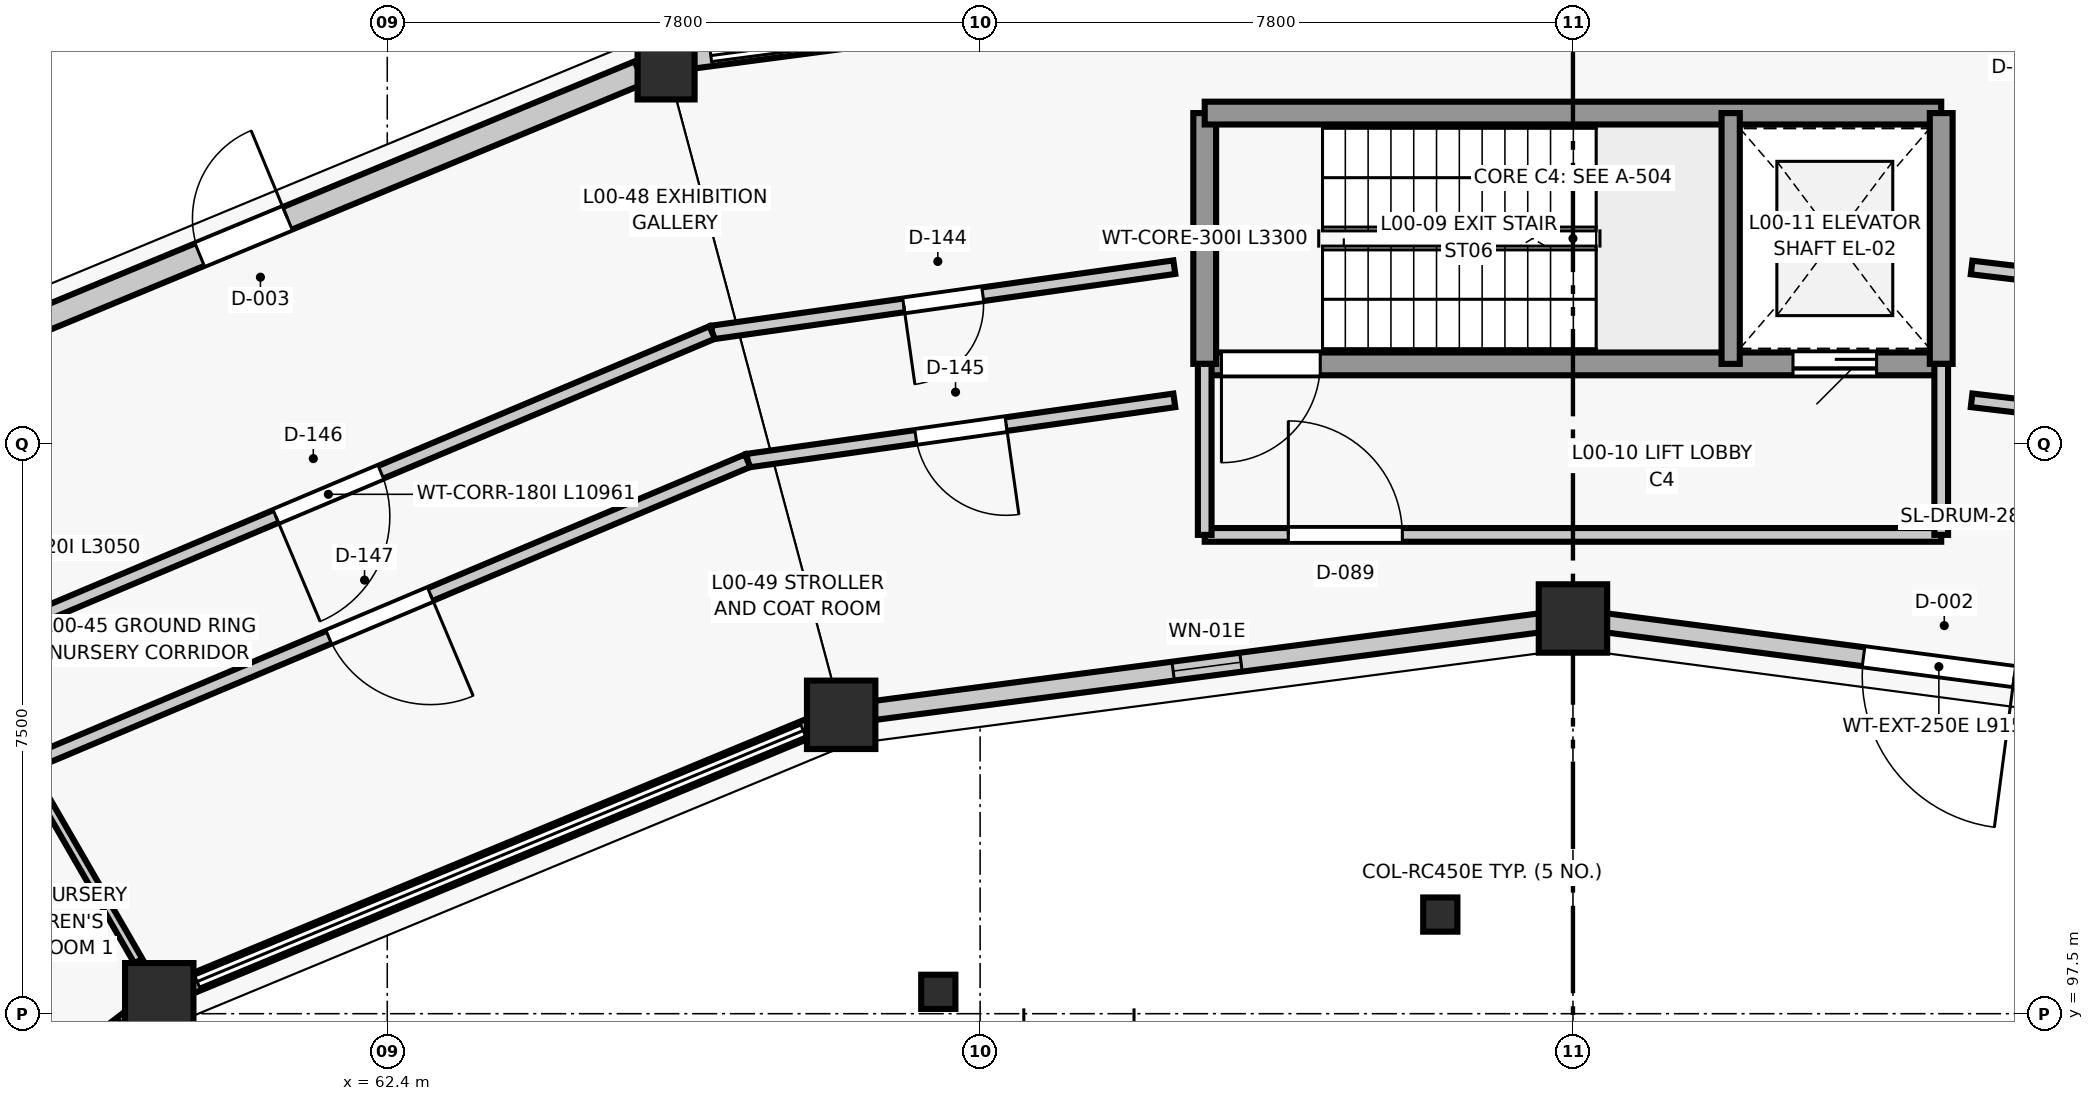
"""IFC4 building model, lengths in metres.
Left out: names, types, materials, properties, quantities, classifications, styles, units other than length and angle.
Written with IfcOpenShell. Run it as: python <this file> out.ifc"""

import sys

from ifc_helpers import new_model, si_unit, direction, frame, frame_2d, origin, origin_2d, place, context, subcontext, project, spatial, rectangle, circle, extrude, element, fill, save


model = new_model("IFC4")
c1 = context("Model", 3, precision=1e-05, world=origin(), true_north=direction((0.0, 1.0)))
c2 = subcontext(c1, "Body", "Model", "MODEL_VIEW")
j1 = project(units=[si_unit("LENGTHUNIT", "METRE"), si_unit("PLANEANGLEUNIT", "RADIAN")], contexts=[c1])
p1 = place(None, origin())
s1 = spatial("IfcSite", under=j1, at=p1, CompositionType="ELEMENT")
p2 = place(p1, origin())
s2 = spatial("IfcBuilding", under=s1, at=p2, CompositionType="ELEMENT")
p3 = place(p2, origin())
s3 = spatial("IfcBuildingStorey", under=s2, at=p3, CompositionType="ELEMENT", Elevation=0.0)
for number, where, z_axis, x_axis in (
    (1, (78.0, 102.7, 0.0), (0.0, 0.0, 1.0), (1.0, 0.0, 0.0)),
    (2, (68.372, 101.432, 0.0), (0.0, 0.0, 1.0), (1.0, 0.0, 0.0)),
    (3, (59.4, 97.716, 0.0), (0.0, 0.0, 1.0), (1.0, 0.0, 0.0)),
):
    element("IfcColumn", number, at=place(p3, frame(where, z_axis=z_axis, x_axis=x_axis)), inside=s3, PredefinedType="COLUMN", context=c2, shape_type="SweptSolid", body=[
        extrude(circle(Radius=0.45, at=origin_2d()), origin(), (0.0, 0.0, 1.0), 4.5),
    ])
p4 = place(p3, frame((66.068, 110.029, 0.0), z_axis=(0.0, 0.0, 1.0), x_axis=(1.0, 0.0, 0.0)))
e4 = element("IfcColumn", 4, at=p4, inside=s3, PredefinedType="COLUMN", context=c2, shape_type="SweptSolid", body=[
    extrude(rectangle(XDim=0.75, YDim=1.0, at=origin_2d()), origin(), (0.0, 0.0, 1.0), 4.5),
])
for number, where, z_axis, x_axis in (
    (5, (76.255, 98.804, 0.0), (0.0, 0.0, 1.0), (1.0, 0.0, 0.0)),
    (6, (69.65, 97.788, 0.0), (0.0, 0.0, 1.0), (1.0, 0.0, 0.0)),
):
    element("IfcColumn", number, at=place(p3, frame(where, z_axis=z_axis, x_axis=x_axis)), inside=s3, PredefinedType="COLUMN", context=c2, shape_type="SweptSolid", body=[
        extrude(rectangle(XDim=0.45, YDim=0.45, at=origin_2d()), origin(), (0.0, 0.0, 1.0), 4.5),
    ])
p5 = place(p3, frame((78.35, 111.554, 0.0), z_axis=(0.0, 0.0, 1.0), x_axis=(0.991443215359, -0.130538694334, 0.0)))
e7 = element("IfcWall", 7, at=p5, inside=s3, PredefinedType="STANDARD", context=c2, shape_type="SweptSolid", body=[
    extrude(rectangle(XDim=11.328, YDim=0.32, at=frame_2d((5.664, 0.0))), origin(), (0.0, 0.0, 1.0), 3.466),
])
p6 = place(p5, frame((4.564, 0.0, 0.0)))
e8 = element("IfcOpeningElement", 8, at=p6, cuts=e7, PredefinedType="OPENING", context=c2, shape_type="SweptSolid", body=[
    extrude(rectangle(XDim=2.2, YDim=2.35, at=frame_2d((1.1, 1.175))), frame((0.0, 0.17, 0.0), z_axis=(0.0, -1.0, 0.0), x_axis=(1.0, 0.0, 0.0)), (0.0, 0.0, 1.0), 0.34),
])
p7 = place(p3, frame((87.353, 101.469, 0.0), z_axis=(0.0, 0.0, 1.0), x_axis=(-0.991441766434, 0.130549698469, 0.0)))
e9 = element("IfcWall", 9, at=p7, inside=s3, PredefinedType="STANDARD", context=c2, shape_type="SweptSolid", body=[
    extrude(rectangle(XDim=9.156, YDim=0.25, at=frame_2d((4.578, 0.0))), origin(), (0.0, 0.0, 1.0), 3.549),
])
p8 = place(p7, frame((3.578, 0.0, 0.0)))
e10 = element("IfcOpeningElement", 10, at=p8, cuts=e9, PredefinedType="OPENING", context=c2, shape_type="SweptSolid", body=[
    extrude(rectangle(XDim=2.0, YDim=2.3, at=frame_2d((1.0, 1.15))), frame((0.0, 0.135, 0.0), z_axis=(0.0, -1.0, 0.0), x_axis=(1.0, 0.0, 0.0)), (0.0, 0.0, 1.0), 0.27),
])
p9 = place(p3, frame((66.419, 110.075, 0.0), z_axis=(0.0, 0.0, 1.0), x_axis=(0.991443215359, 0.130538694334, 0.0)))
e11 = element("IfcWall", 11, at=p9, inside=s3, PredefinedType="STANDARD", context=c2, shape_type="SweptSolid", body=[
    extrude(rectangle(XDim=11.328, YDim=0.28, at=frame_2d((5.664, 0.0))), origin(), (0.0, 0.0, 1.0), 0.82),
])
p10 = place(p3, frame((77.725, 102.664, 0.0), z_axis=(0.0, 0.0, 1.0), x_axis=(-0.991441766434, -0.130549698469, 0.0)))
e12 = element("IfcWall", 12, at=p10, inside=s3, PredefinedType="STANDARD", context=c2, shape_type="SweptSolid", body=[
    extrude(rectangle(XDim=9.156, YDim=0.25, at=frame_2d((4.578, 0.0))), origin(), (0.0, 0.0, 1.0), 3.549),
])
p11 = place(p10, frame((4.128, 0.0, 0.85)))
e13 = element("IfcOpeningElement", 13, at=p11, cuts=e12, PredefinedType="OPENING", context=c2, shape_type="SweptSolid", body=[
    extrude(rectangle(XDim=0.9, YDim=0.9, at=frame_2d((0.45, 0.45))), frame((0.0, 0.135, 0.0), z_axis=(0.0, -1.0, 0.0), x_axis=(1.0, 0.0, 0.0)), (0.0, 0.0, 1.0), 0.27),
])
p12 = place(p3, frame((55.302, 105.57, 0.0), z_axis=(0.0, 0.0, 1.0), x_axis=(0.923883530636, 0.382673779896, 0.0)))
e14 = element("IfcWall", 14, at=p12, inside=s3, PredefinedType="STANDARD", context=c2, shape_type="SweptSolid", body=[
    extrude(rectangle(XDim=11.272, YDim=0.32, at=frame_2d((5.636, 0.0))), origin(), (0.0, 0.0, 1.0), 3.466),
])
p13 = place(p12, frame((5.011, 0.0, 0.0)))
e15 = element("IfcOpeningElement", 15, at=p13, cuts=e14, PredefinedType="OPENING", context=c2, shape_type="SweptSolid", body=[
    extrude(rectangle(XDim=1.25, YDim=2.2, at=frame_2d((0.625, 1.1))), frame((0.0, 0.17, 0.0), z_axis=(0.0, -1.0, 0.0), x_axis=(1.0, 0.0, 0.0)), (0.0, 0.0, 1.0), 0.34),
])
p14 = place(p3, frame((68.095, 101.318, 0.0), z_axis=(0.0, 0.0, 1.0), x_axis=(-0.923880324771, -0.382681519675, 0.0)))
e16 = element("IfcWall", 16, at=p14, inside=s3, PredefinedType="STANDARD", context=c2, shape_type="SweptSolid", body=[
    extrude(rectangle(XDim=9.112, YDim=0.25, at=frame_2d((4.556, 0.0))), origin(), (0.0, 0.0, 1.0), 0.82),
])
p15 = place(p3, frame((59.12, 97.501, 0.0), z_axis=(0.0, 0.0, 1.0), x_axis=(-0.793347085527, -0.608769580289, 0.0)))
e17 = element("IfcWall", 17, at=p15, inside=s3, PredefinedType="STANDARD", context=c2, shape_type="SweptSolid", body=[
    extrude(rectangle(XDim=9.005, YDim=0.25, at=frame_2d((4.502, 0.0))), origin(), (0.0, 0.0, 1.0), 0.82),
])
p16 = place(p3, frame((82.845, 106.05, 0.0), z_axis=(0.0, 0.0, 1.0), x_axis=(-1.0, 0.0, 0.0)))
e18 = element("IfcWall", 18, at=p16, inside=s3, PredefinedType="SHEAR", context=c2, shape_type="SweptSolid", body=[
    extrude(rectangle(XDim=9.69, YDim=0.3, at=frame_2d((4.845, 0.0))), origin(), (0.0, 0.0, 1.0), 4.5),
])
p17 = place(p16, frame((8.17, 0.0, 0.0)))
e19 = element("IfcOpeningElement", 19, at=p17, cuts=e18, PredefinedType="OPENING", context=c2, shape_type="SweptSolid", body=[
    extrude(rectangle(XDim=1.3, YDim=2.15, at=frame_2d((0.65, 1.075))), frame((0.0, 0.16, 0.0), z_axis=(0.0, -1.0, 0.0), x_axis=(1.0, 0.0, 0.0)), (0.0, 0.0, 1.0), 0.32),
])
p18 = place(p16, frame((0.85, 0.0, 0.0)))
e20 = element("IfcOpeningElement", 20, at=p18, cuts=e18, PredefinedType="OPENING", context=c2, shape_type="SweptSolid", body=[
    extrude(rectangle(XDim=1.1, YDim=2.15, at=frame_2d((0.55, 1.075))), frame((0.0, 0.16, 0.0), z_axis=(0.0, -1.0, 0.0), x_axis=(1.0, 0.0, 0.0)), (0.0, 0.0, 1.0), 0.32),
])
p19 = place(p3, frame((73.155, 106.05, 0.0), z_axis=(0.0, 0.0, 1.0), x_axis=(0.0, 1.0, 0.0)))
e21 = element("IfcWall", 21, at=p19, inside=s3, PredefinedType="SHEAR", context=c2, shape_type="SweptSolid", body=[
    extrude(rectangle(XDim=3.3, YDim=0.3, at=frame_2d((1.65, 0.0))), origin(), (0.0, 0.0, 1.0), 4.5),
])
p20 = place(p3, frame((73.155, 109.35, 0.0), z_axis=(0.0, 0.0, 1.0), x_axis=(1.0, 0.0, 0.0)))
e22 = element("IfcWall", 22, at=p20, inside=s3, PredefinedType="SHEAR", context=c2, shape_type="SweptSolid", body=[
    extrude(rectangle(XDim=9.69, YDim=0.3, at=frame_2d((4.845, 0.0))), origin(), (0.0, 0.0, 1.0), 4.5),
])
p21 = place(p3, frame((82.845, 109.35, 0.0), z_axis=(0.0, 0.0, 1.0), x_axis=(0.0, -1.0, 0.0)))
e23 = element("IfcWall", 23, at=p21, inside=s3, PredefinedType="SHEAR", context=c2, shape_type="SweptSolid", body=[
    extrude(rectangle(XDim=3.3, YDim=0.3, at=frame_2d((1.65, 0.0))), origin(), (0.0, 0.0, 1.0), 4.5),
])
p22 = place(p3, frame((80.075, 106.05, 0.0), z_axis=(0.0, 0.0, 1.0), x_axis=(0.0, 1.0, 0.0)))
e24 = element("IfcWall", 24, at=p22, inside=s3, PredefinedType="SHEAR", context=c2, shape_type="SweptSolid", body=[
    extrude(rectangle(XDim=3.3, YDim=0.24, at=frame_2d((1.65, 0.0))), origin(), (0.0, 0.0, 1.0), 4.5),
])
p23 = place(p3, frame((73.155, 103.8, 0.0), z_axis=(0.0, 0.0, 1.0), x_axis=(1.0, 0.0, 0.0)))
e25 = element("IfcWall", 25, at=p23, inside=s3, PredefinedType="PARTITIONING", context=c2, shape_type="SweptSolid", body=[
    extrude(rectangle(XDim=9.69, YDim=0.18, at=frame_2d((4.845, 0.0))), origin(), (0.0, 0.0, 1.0), 4.255),
])
p24 = place(p23, frame((1.1, 0.0, 0.0)))
e26 = element("IfcOpeningElement", 26, at=p24, cuts=e25, PredefinedType="OPENING", context=c2, shape_type="SweptSolid", body=[
    extrude(rectangle(XDim=1.5, YDim=2.15, at=frame_2d((0.75, 1.075))), frame((0.0, 0.1, 0.0), z_axis=(0.0, -1.0, 0.0), x_axis=(1.0, 0.0, 0.0)), (0.0, 0.0, 1.0), 0.2),
])
for number, where, z_axis, x_axis in (
    (27, (73.155, 106.05, 0.0), (0.0, 0.0, 1.0), (0.0, -1.0, 0.0)),
    (28, (82.845, 106.05, 0.0), (0.0, 0.0, 1.0), (0.0, -1.0, 0.0)),
):
    element("IfcWall", number, at=place(p3, frame(where, z_axis=z_axis, x_axis=x_axis)), inside=s3, PredefinedType="PARTITIONING", context=c2, shape_type="SweptSolid", body=[
        extrude(rectangle(XDim=2.25, YDim=0.18, at=frame_2d((1.125, 0.0))), origin(), (0.0, 0.0, 1.0), 4.255),
    ])
p25 = place(p3, frame((88.413, 106.705, 0.0), z_axis=(0.0, 0.0, 1.0), x_axis=(-0.993019970185, 0.117946338706, 0.0)))
e29 = element("IfcWall", 29, at=p25, inside=s3, PredefinedType="PARTITIONING", context=c2, shape_type="SweptSolid", body=[
    extrude(rectangle(XDim=5.204, YDim=0.18, at=frame_2d((2.602, 0.0))), origin(), (0.0, 0.0, 1.0), 4.255),
])
p26 = place(p25, frame((1.877, 0.0, 0.0)))
e30 = element("IfcOpeningElement", 30, at=p26, cuts=e29, PredefinedType="OPENING", context=c2, shape_type="SweptSolid", body=[
    extrude(rectangle(XDim=1.45, YDim=2.2, at=frame_2d((0.725, 1.1))), frame((0.0, 0.1, 0.0), z_axis=(0.0, -1.0, 0.0), x_axis=(1.0, 0.0, 0.0)), (0.0, 0.0, 1.0), 0.2),
])
p27 = place(p3, frame((87.984, 105.008, 0.0), z_axis=(0.0, 0.0, 1.0), x_axis=(-0.993021837472, 0.117930616486, 0.0)))
e31 = element("IfcWall", 31, at=p27, inside=s3, PredefinedType="PARTITIONING", context=c2, shape_type="SweptSolid", body=[
    extrude(rectangle(XDim=4.772, YDim=0.18, at=frame_2d((2.386, 0.0))), origin(), (0.0, 0.0, 1.0), 4.255),
])
p28 = place(p27, frame((1.911, 0.0, 0.0)))
e32 = element("IfcOpeningElement", 32, at=p28, cuts=e31, PredefinedType="OPENING", context=c2, shape_type="SweptSolid", body=[
    extrude(rectangle(XDim=0.95, YDim=2.1, at=frame_2d((0.475, 1.05))), frame((0.0, 0.1, 0.0), z_axis=(0.0, -1.0, 0.0), x_axis=(1.0, 0.0, 0.0)), (0.0, 0.0, 1.0), 0.2),
])
p29 = place(p3, frame((72.755, 107.323, 0.0), z_axis=(0.0, 0.0, 1.0), x_axis=(-0.990158330555, -0.139951707499, 0.0)))
e33 = element("IfcWall", 33, at=p29, inside=s3, PredefinedType="PARTITIONING", context=c2, shape_type="SweptSolid", body=[
    extrude(rectangle(XDim=6.141, YDim=0.18, at=frame_2d((3.07, 0.0))), origin(), (0.0, 0.0, 1.0), 4.255),
])
p30 = place(p29, frame((2.545, 0.0, 0.0)))
e34 = element("IfcOpeningElement", 34, at=p30, cuts=e33, PredefinedType="OPENING", context=c2, shape_type="SweptSolid", body=[
    extrude(rectangle(XDim=1.05, YDim=2.1, at=frame_2d((0.525, 1.05))), frame((0.0, 0.1, 0.0), z_axis=(0.0, -1.0, 0.0), x_axis=(1.0, 0.0, 0.0)), (0.0, 0.0, 1.0), 0.2),
])
p31 = place(p3, frame((72.755, 105.57, 0.0), z_axis=(0.0, 0.0, 1.0), x_axis=(-0.990158541411, -0.13995021569, 0.0)))
e35 = element("IfcWall", 35, at=p31, inside=s3, PredefinedType="PARTITIONING", context=c2, shape_type="SweptSolid", body=[
    extrude(rectangle(XDim=5.67, YDim=0.18, at=frame_2d((2.835, 0.0))), origin(), (0.0, 0.0, 1.0), 4.255),
])
p32 = place(p31, frame((2.235, 0.0, 0.0)))
e36 = element("IfcOpeningElement", 36, at=p32, cuts=e35, PredefinedType="OPENING", context=c2, shape_type="SweptSolid", body=[
    extrude(rectangle(XDim=1.2, YDim=2.15, at=frame_2d((0.6, 1.075))), frame((0.0, 0.1, 0.0), z_axis=(0.0, -1.0, 0.0), x_axis=(1.0, 0.0, 0.0)), (0.0, 0.0, 1.0), 0.2),
])
p33 = place(p3, frame((66.675, 106.463, 0.0), z_axis=(0.0, 0.0, 1.0), x_axis=(-0.921432324462, -0.388538893082, 0.0)))
e37 = element("IfcWall", 37, at=p33, inside=s3, PredefinedType="PARTITIONING", context=c2, shape_type="SweptSolid", body=[
    extrude(rectangle(XDim=10.961, YDim=0.18, at=frame_2d((5.48, 0.0))), origin(), (0.0, 0.0, 1.0), 4.255),
])
p34 = place(p33, frame((4.73, 0.0, 0.0)))
e38 = element("IfcOpeningElement", 38, at=p34, cuts=e37, PredefinedType="OPENING", context=c2, shape_type="SweptSolid", body=[
    extrude(rectangle(XDim=1.5, YDim=2.15, at=frame_2d((0.75, 1.075))), frame((0.0, 0.1, 0.0), z_axis=(0.0, -1.0, 0.0), x_axis=(1.0, 0.0, 0.0)), (0.0, 0.0, 1.0), 0.2),
])
p35 = place(p3, frame((67.141, 104.777, 0.0), z_axis=(0.0, 0.0, 1.0), x_axis=(-0.921427975161, -0.388549207426, 0.0)))
e39 = element("IfcWall", 39, at=p35, inside=s3, PredefinedType="PARTITIONING", context=c2, shape_type="SweptSolid", body=[
    extrude(rectangle(XDim=10.51, YDim=0.18, at=frame_2d((5.255, 0.0))), origin(), (0.0, 0.0, 1.0), 4.255),
])
p36 = place(p35, frame((4.53, 0.0, 0.0)))
e40 = element("IfcOpeningElement", 40, at=p36, cuts=e39, PredefinedType="OPENING", context=c2, shape_type="SweptSolid", body=[
    extrude(rectangle(XDim=1.45, YDim=2.2, at=frame_2d((0.725, 1.1))), frame((0.0, 0.1, 0.0), z_axis=(0.0, -1.0, 0.0), x_axis=(1.0, 0.0, 0.0)), (0.0, 0.0, 1.0), 0.2),
])
p37 = place(p3, frame((59.125, 98.192, 0.0), z_axis=(0.0, 0.0, 1.0), x_axis=(-0.499990139034, 0.866031096941, 0.0)))
e41 = element("IfcWall", 41, at=p37, inside=s3, PredefinedType="PARTITIONING", context=c2, shape_type="SweptSolid", body=[
    extrude(rectangle(XDim=3.0, YDim=0.12, at=frame_2d((1.5, 0.0))), origin(), (0.0, 0.0, 1.0), 3.495),
])
p38 = place(p8, origin())
e42 = element("IfcDoor", 42, at=p38, inside=s3, OperationType="SINGLE_SWING_LEFT", PredefinedType="DOOR", context=c2, shape_type="SweptSolid", body=[
    extrude(rectangle(XDim=2.0, YDim=2.3, at=frame_2d((1.0, 1.15))), frame((0.0, 0.025, 0.0), z_axis=(0.0, -1.0, 0.0), x_axis=(1.0, 0.0, 0.0)), (0.0, 0.0, 1.0), 0.05),
])
fill(e10, e42)
p39 = place(p11, origin())
e43 = element("IfcWindow", 43, at=p39, inside=s3, PartitioningType="SINGLE_PANEL", PredefinedType="WINDOW", context=c2, shape_type="SweptSolid", body=[
    extrude(rectangle(XDim=0.9, YDim=0.9, at=frame_2d((0.45, 0.45))), frame((0.0, 0.03, 0.0), z_axis=(0.0, -1.0, 0.0), x_axis=(1.0, 0.0, 0.0)), (0.0, 0.0, 1.0), 0.06),
])
fill(e13, e43)
p40 = place(p13, origin())
e44 = element("IfcDoor", 44, at=p40, inside=s3, OperationType="SINGLE_SWING_RIGHT", PredefinedType="DOOR", context=c2, shape_type="SweptSolid", body=[
    extrude(rectangle(XDim=1.25, YDim=2.2, at=frame_2d((0.625, 1.1))), frame((0.0, 0.025, 0.0), z_axis=(0.0, -1.0, 0.0), x_axis=(1.0, 0.0, 0.0)), (0.0, 0.0, 1.0), 0.05),
])
fill(e15, e44)
p41 = place(p17, origin())
e45 = element("IfcDoor", 45, at=p41, inside=s3, OperationType="SINGLE_SWING_RIGHT", PredefinedType="DOOR", context=c2, shape_type="SweptSolid", body=[
    extrude(rectangle(XDim=1.3, YDim=2.15, at=frame_2d((0.65, 1.075))), frame((0.0, 0.025, 0.0), z_axis=(0.0, -1.0, 0.0), x_axis=(1.0, 0.0, 0.0)), (0.0, 0.0, 1.0), 0.05),
])
fill(e19, e45)
p42 = place(p18, origin())
e46 = element("IfcDoor", 46, at=p42, inside=s3, OperationType="SLIDING_TO_LEFT", PredefinedType="DOOR", context=c2, shape_type="SweptSolid", body=[
    extrude(rectangle(XDim=1.1, YDim=2.15, at=frame_2d((0.55, 1.075))), frame((0.0, 0.025, 0.0), z_axis=(0.0, -1.0, 0.0), x_axis=(1.0, 0.0, 0.0)), (0.0, 0.0, 1.0), 0.05),
])
fill(e20, e46)
p43 = place(p24, origin())
e47 = element("IfcDoor", 47, at=p43, inside=s3, OperationType="SINGLE_SWING_LEFT", PredefinedType="DOOR", context=c2, shape_type="SweptSolid", body=[
    extrude(rectangle(XDim=1.5, YDim=2.15, at=frame_2d((0.75, 1.075))), frame((0.0, 0.025, 0.0), z_axis=(0.0, -1.0, 0.0), x_axis=(1.0, 0.0, 0.0)), (0.0, 0.0, 1.0), 0.05),
])
fill(e26, e47)
p44 = place(p30, origin())
e48 = element("IfcDoor", 48, at=p44, inside=s3, OperationType="SINGLE_SWING_RIGHT", PredefinedType="DOOR", context=c2, shape_type="SweptSolid", body=[
    extrude(rectangle(XDim=1.05, YDim=2.1, at=frame_2d((0.525, 1.05))), frame((0.0, 0.025, 0.0), z_axis=(0.0, -1.0, 0.0), x_axis=(1.0, 0.0, 0.0)), (0.0, 0.0, 1.0), 0.05),
])
fill(e34, e48)
p45 = place(p32, origin())
e49 = element("IfcDoor", 49, at=p45, inside=s3, OperationType="SINGLE_SWING_LEFT", PredefinedType="DOOR", context=c2, shape_type="SweptSolid", body=[
    extrude(rectangle(XDim=1.2, YDim=2.15, at=frame_2d((0.6, 1.075))), frame((0.0, 0.025, 0.0), z_axis=(0.0, -1.0, 0.0), x_axis=(1.0, 0.0, 0.0)), (0.0, 0.0, 1.0), 0.05),
])
fill(e36, e49)
p46 = place(p34, origin())
e50 = element("IfcDoor", 50, at=p46, inside=s3, OperationType="SINGLE_SWING_RIGHT", PredefinedType="DOOR", context=c2, shape_type="SweptSolid", body=[
    extrude(rectangle(XDim=1.5, YDim=2.15, at=frame_2d((0.75, 1.075))), frame((0.0, 0.025, 0.0), z_axis=(0.0, -1.0, 0.0), x_axis=(1.0, 0.0, 0.0)), (0.0, 0.0, 1.0), 0.05),
])
fill(e38, e50)
p47 = place(p36, origin())
e51 = element("IfcDoor", 51, at=p47, inside=s3, OperationType="SINGLE_SWING_LEFT", PredefinedType="DOOR", context=c2, shape_type="SweptSolid", body=[
    extrude(rectangle(XDim=1.45, YDim=2.2, at=frame_2d((0.725, 1.1))), frame((0.0, 0.025, 0.0), z_axis=(0.0, -1.0, 0.0), x_axis=(1.0, 0.0, 0.0)), (0.0, 0.0, 1.0), 0.05),
])
fill(e40, e51)
save(model, sys.argv[1])
